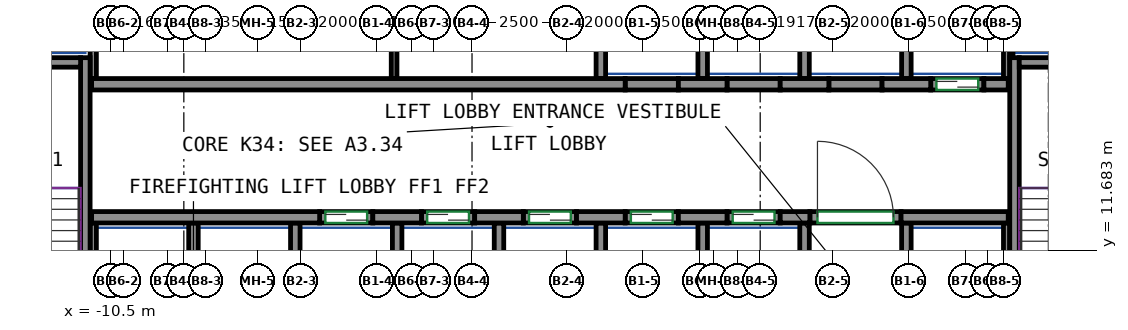
"""IFC4 building model, lengths in metres.
Left out: names, types, materials, properties, quantities, classifications, styles, units other than length and angle.
Written with IfcOpenShell. Run it as: python <this file> out.ifc"""

import sys

from ifc_helpers import new_model, si_unit, direction, frame, frame_2d, origin, place, context, subcontext, project, spatial, rectangle, extrude, source, transform, mapped, element, fill, save


model = new_model("IFC4")
c1 = context("Model", 3, precision=1e-05, world=origin(), true_north=direction((0.0, 1.0)))
c2 = subcontext(c1, "Body", "Model", "MODEL_VIEW")
j1 = project(units=[si_unit("LENGTHUNIT", "METRE"), si_unit("PLANEANGLEUNIT", "RADIAN")], contexts=[c1])
p1 = place(None, origin())
s1 = spatial("IfcSite", under=j1, at=p1, CompositionType="ELEMENT")
p2 = place(p1, origin())
s2 = spatial("IfcBuilding", under=s1, at=p2, CompositionType="ELEMENT")
p3 = place(p2, frame((0.0, 0.0, 147.3)))
s3 = spatial("IfcBuildingStorey", under=s2, at=p3, CompositionType="ELEMENT", Elevation=147.3)
m1 = source(origin(), c2, "Body", "SweptSolid", [
    extrude(rectangle(XDim=7.75, YDim=0.25, at=frame_2d((3.875, 0.0))), origin(), (0.0, 0.0, 1.0), 3.12),
])
p4 = place(p3, frame((-11.175, 9.0, 0.0), z_axis=(0.0, 0.0, 1.0), x_axis=(0.0, 1.0, 0.0)))
e1 = element("IfcWall", 1, at=p4, inside=s3, PredefinedType="SHEAR", context=c2, shape_type="MappedRepresentation", body=[
    mapped(m1, transform((0.0, 0.0, 0.0))),
])
m2 = source(origin(), c2, "Body", "SweptSolid", [
    extrude(rectangle(XDim=3.7, YDim=0.25, at=frame_2d((1.85, 0.0))), origin(), (0.0, 0.0, 1.0), 3.12),
])
p5 = place(p3, frame((-15.0, 16.625, 0.0), z_axis=(0.0, 0.0, 1.0), x_axis=(1.0, 0.0, 0.0)))
e2 = element("IfcWall", 2, at=p5, inside=s3, PredefinedType="SHEAR", context=c2, shape_type="MappedRepresentation", body=[
    mapped(m2, transform((0.0, 0.0, 0.0))),
])
p6 = place(p3, frame((13.275, 9.0, 0.0), z_axis=(0.0, 0.0, 1.0), x_axis=(0.0, 1.0, 0.0)))
e3 = element("IfcWall", 3, at=p6, inside=s3, PredefinedType="SHEAR", context=c2, shape_type="MappedRepresentation", body=[
    mapped(m1, transform((0.0, 0.0, 0.0))),
])
m3 = source(origin(), c2, "Body", "SweptSolid", [
    extrude(rectangle(XDim=3.7, YDim=0.25, at=frame_2d((1.85, 0.0))), origin(), (0.0, 0.0, 1.0), 3.12),
])
p7 = place(p3, frame((13.4, 16.625, 0.0), z_axis=(0.0, 0.0, 1.0), x_axis=(1.0, 0.0, 0.0)))
e4 = element("IfcWall", 4, at=p7, inside=s3, PredefinedType="SHEAR", context=c2, shape_type="MappedRepresentation", body=[
    mapped(m3, transform((0.0, 0.0, 0.0))),
])
m4 = source(origin(), c2, "Body", "SweptSolid", [
    extrude(rectangle(XDim=6.0, YDim=0.3, at=frame_2d((3.0, 0.0))), origin(), (0.0, 0.0, 1.0), 3.12),
])
p8 = place(p3, frame((-11.01, 12.55, 0.0), z_axis=(0.0, 0.0, 1.0), x_axis=(1.0, 0.0, 0.0)))
e5 = element("IfcWall", 5, at=p8, inside=s3, PredefinedType="SHEAR", context=c2, shape_type="MappedRepresentation", body=[
    mapped(m4, transform((0.0, 0.0, 0.0))),
])
m5 = source(origin(), c2, "Body", "SweptSolid", [
    extrude(rectangle(XDim=1.28, YDim=0.3, at=frame_2d((0.64, 0.0))), origin(), (0.0, 0.0, 1.0), 3.12),
])
for number, where, z_axis, x_axis in (
    (6, (-3.61, 12.55, 0.0), (0.0, 0.0, 1.0), (1.0, 0.0, 0.0)),
    (7, (-0.93, 12.55, 0.0), (0.0, 0.0, 1.0), (1.0, 0.0, 0.0)),
    (8, (1.75, 12.55, 0.0), (0.0, 0.0, 1.0), (1.0, 0.0, 0.0)),
    (9, (4.43, 12.55, 0.0), (0.0, 0.0, 1.0), (1.0, 0.0, 0.0)),
):
    element("IfcWall", number, at=place(p3, frame(where, z_axis=z_axis, x_axis=x_axis)), inside=s3, PredefinedType="SHEAR", context=c2, shape_type="MappedRepresentation", body=[
        mapped(m5, transform((0.0, 0.0, 0.0))),
    ])
m6 = source(origin(), c2, "Body", "SweptSolid", [
    extrude(rectangle(XDim=0.78, YDim=0.3, at=frame_2d((0.39, 0.0))), origin(), (0.0, 0.0, 1.0), 3.12),
])
p9 = place(p3, frame((7.11, 12.55, 0.0), z_axis=(0.0, 0.0, 1.0), x_axis=(1.0, 0.0, 0.0)))
e10 = element("IfcWall", 10, at=p9, inside=s3, PredefinedType="SHEAR", context=c2, shape_type="MappedRepresentation", body=[
    mapped(m6, transform((0.0, 0.0, 0.0))),
])
m7 = source(origin(), c2, "Body", "SweptSolid", [
    extrude(rectangle(XDim=2.82, YDim=0.3, at=frame_2d((1.41, 0.0))), origin(), (0.0, 0.0, 1.0), 3.12),
])
p10 = place(p3, frame((10.29, 12.55, 0.0), z_axis=(0.0, 0.0, 1.0), x_axis=(1.0, 0.0, 0.0)))
e11 = element("IfcWall", 11, at=p10, inside=s3, PredefinedType="SHEAR", context=c2, shape_type="MappedRepresentation", body=[
    mapped(m7, transform((0.0, 0.0, 0.0))),
])
m8 = source(origin(), c2, "Body", "SweptSolid", [
    extrude(rectangle(XDim=14.04, YDim=0.3, at=frame_2d((7.02, 0.0))), origin(), (0.0, 0.0, 1.0), 3.12),
])
p11 = place(p3, frame((-11.01, 16.05, 0.0), z_axis=(0.0, 0.0, 1.0), x_axis=(1.0, 0.0, 0.0)))
e12 = element("IfcWall", 12, at=p11, inside=s3, PredefinedType="SHEAR", context=c2, shape_type="MappedRepresentation", body=[
    mapped(m8, transform((0.0, 0.0, 0.0))),
])
p12 = place(p3, frame((4.43, 16.05, 0.0), z_axis=(0.0, 0.0, 1.0), x_axis=(1.0, 0.0, 0.0)))
e13 = element("IfcWall", 13, at=p12, inside=s3, PredefinedType="SHEAR", context=c2, shape_type="MappedRepresentation", body=[
    mapped(m5, transform((0.0, 0.0, 0.0))),
])
m9 = source(origin(), c2, "Body", "SweptSolid", [
    extrude(rectangle(XDim=1.28, YDim=0.3, at=frame_2d((0.64, 0.0))), origin(), (0.0, 0.0, 1.0), 3.12),
])
p13 = place(p3, frame((7.11, 16.05, 0.0), z_axis=(0.0, 0.0, 1.0), x_axis=(1.0, 0.0, 0.0)))
e14 = element("IfcWall", 14, at=p13, inside=s3, PredefinedType="SHEAR", context=c2, shape_type="MappedRepresentation", body=[
    mapped(m9, transform((0.0, 0.0, 0.0))),
])
p14 = place(p3, frame((9.79, 16.05, 0.0), z_axis=(0.0, 0.0, 1.0), x_axis=(1.0, 0.0, 0.0)))
e15 = element("IfcWall", 15, at=p14, inside=s3, PredefinedType="SHEAR", context=c2, shape_type="MappedRepresentation", body=[
    mapped(m5, transform((0.0, 0.0, 0.0))),
])
m10 = source(origin(), c2, "Body", "SweptSolid", [
    extrude(rectangle(XDim=0.64, YDim=0.3, at=frame_2d((0.32, 0.0))), origin(), (0.0, 0.0, 1.0), 3.12),
])
p15 = place(p3, frame((12.47, 16.05, 0.0), z_axis=(0.0, 0.0, 1.0), x_axis=(1.0, 0.0, 0.0)))
e16 = element("IfcWall", 16, at=p15, inside=s3, PredefinedType="SHEAR", context=c2, shape_type="MappedRepresentation", body=[
    mapped(m10, transform((0.0, 0.0, 0.0))),
])
m11 = source(origin(), c2, "Body", "SweptSolid", [
    extrude(rectangle(XDim=1.4, YDim=0.3, at=frame_2d((0.7, 0.0))), origin(), (0.0, 0.0, 1.0), 3.12),
])
p16 = place(p3, frame((-5.01, 12.55, 0.0), z_axis=(0.0, 0.0, 1.0), x_axis=(1.0, 0.0, 0.0)))
e17 = element("IfcWall", 17, at=p16, inside=s3, PredefinedType="PARTITIONING", context=c2, shape_type="MappedRepresentation", body=[
    mapped(m11, transform((0.0, 0.0, 0.0))),
])
p17 = place(p16, frame((0.15, 0.0, 0.0)))
e18 = element("IfcOpeningElement", 18, at=p17, cuts=e17, PredefinedType="OPENING", context=c2, shape_type="SweptSolid", body=[
    extrude(rectangle(XDim=1.1, YDim=2.1, at=frame_2d((0.55, 1.05))), frame((0.0, 0.16, 0.0), z_axis=(0.0, -1.0, 0.0), x_axis=(1.0, 0.0, 0.0)), (0.0, 0.0, 1.0), 0.32),
])
m12 = source(origin(), c2, "Body", "SweptSolid", [
    extrude(rectangle(XDim=1.4, YDim=0.3, at=frame_2d((0.7, 0.0))), origin(), (0.0, 0.0, 1.0), 3.12),
])
p18 = place(p3, frame((-2.33, 12.55, 0.0), z_axis=(0.0, 0.0, 1.0), x_axis=(1.0, 0.0, 0.0)))
e19 = element("IfcWall", 19, at=p18, inside=s3, PredefinedType="PARTITIONING", context=c2, shape_type="MappedRepresentation", body=[
    mapped(m12, transform((0.0, 0.0, 0.0))),
])
p19 = place(p18, frame((0.15, 0.0, 0.0)))
e20 = element("IfcOpeningElement", 20, at=p19, cuts=e19, PredefinedType="OPENING", context=c2, shape_type="SweptSolid", body=[
    extrude(rectangle(XDim=1.1, YDim=2.1, at=frame_2d((0.55, 1.05))), frame((0.0, 0.16, 0.0), z_axis=(0.0, -1.0, 0.0), x_axis=(1.0, 0.0, 0.0)), (0.0, 0.0, 1.0), 0.32),
])
p20 = place(p3, frame((0.35, 12.55, 0.0), z_axis=(0.0, 0.0, 1.0), x_axis=(1.0, 0.0, 0.0)))
e21 = element("IfcWall", 21, at=p20, inside=s3, PredefinedType="PARTITIONING", context=c2, shape_type="MappedRepresentation", body=[
    mapped(m11, transform((0.0, 0.0, 0.0))),
])
p21 = place(p20, frame((0.15, 0.0, 0.0)))
e22 = element("IfcOpeningElement", 22, at=p21, cuts=e21, PredefinedType="OPENING", context=c2, shape_type="SweptSolid", body=[
    extrude(rectangle(XDim=1.1, YDim=2.1, at=frame_2d((0.55, 1.05))), frame((0.0, 0.16, 0.0), z_axis=(0.0, -1.0, 0.0), x_axis=(1.0, 0.0, 0.0)), (0.0, 0.0, 1.0), 0.32),
])
p22 = place(p3, frame((3.03, 12.55, 0.0), z_axis=(0.0, 0.0, 1.0), x_axis=(1.0, 0.0, 0.0)))
e23 = element("IfcWall", 23, at=p22, inside=s3, PredefinedType="PARTITIONING", context=c2, shape_type="MappedRepresentation", body=[
    mapped(m11, transform((0.0, 0.0, 0.0))),
])
p23 = place(p22, frame((0.15, 0.0, 0.0)))
e24 = element("IfcOpeningElement", 24, at=p23, cuts=e23, PredefinedType="OPENING", context=c2, shape_type="SweptSolid", body=[
    extrude(rectangle(XDim=1.1, YDim=2.1, at=frame_2d((0.55, 1.05))), frame((0.0, 0.16, 0.0), z_axis=(0.0, -1.0, 0.0), x_axis=(1.0, 0.0, 0.0)), (0.0, 0.0, 1.0), 0.32),
])
p24 = place(p3, frame((5.71, 12.55, 0.0), z_axis=(0.0, 0.0, 1.0), x_axis=(1.0, 0.0, 0.0)))
e25 = element("IfcWall", 25, at=p24, inside=s3, PredefinedType="PARTITIONING", context=c2, shape_type="MappedRepresentation", body=[
    mapped(m12, transform((0.0, 0.0, 0.0))),
])
p25 = place(p24, frame((0.15, 0.0, 0.0)))
e26 = element("IfcOpeningElement", 26, at=p25, cuts=e25, PredefinedType="OPENING", context=c2, shape_type="SweptSolid", body=[
    extrude(rectangle(XDim=1.1, YDim=2.1, at=frame_2d((0.55, 1.05))), frame((0.0, 0.16, 0.0), z_axis=(0.0, -1.0, 0.0), x_axis=(1.0, 0.0, 0.0)), (0.0, 0.0, 1.0), 0.32),
])
p26 = place(p3, frame((11.07, 16.05, 0.0), z_axis=(0.0, 0.0, 1.0), x_axis=(1.0, 0.0, 0.0)))
e27 = element("IfcWall", 27, at=p26, inside=s3, PredefinedType="PARTITIONING", context=c2, shape_type="MappedRepresentation", body=[
    mapped(m11, transform((0.0, 0.0, 0.0))),
])
p27 = place(p26, frame((0.15, 0.0, 0.0)))
e28 = element("IfcOpeningElement", 28, at=p27, cuts=e27, PredefinedType="OPENING", context=c2, shape_type="SweptSolid", body=[
    extrude(rectangle(XDim=1.1, YDim=2.1, at=frame_2d((0.55, 1.05))), frame((0.0, 0.16, 0.0), z_axis=(0.0, -1.0, 0.0), x_axis=(1.0, 0.0, 0.0)), (0.0, 0.0, 1.0), 0.32),
])
m13 = source(origin(), c2, "Body", "SweptSolid", [
    extrude(rectangle(XDim=2.4, YDim=0.3, at=frame_2d((1.2, 0.0))), origin(), (0.0, 0.0, 1.0), 3.12),
])
p28 = place(p3, frame((7.89, 12.55, 0.0), z_axis=(0.0, 0.0, 1.0), x_axis=(1.0, 0.0, 0.0)))
e29 = element("IfcWall", 29, at=p28, inside=s3, PredefinedType="PARTITIONING", context=c2, shape_type="MappedRepresentation", body=[
    mapped(m13, transform((0.0, 0.0, 0.0))),
])
p29 = place(p28, frame((0.2, 0.0, 0.0)))
e30 = element("IfcOpeningElement", 30, at=p29, cuts=e29, PredefinedType="OPENING", context=c2, shape_type="SweptSolid", body=[
    extrude(rectangle(XDim=2.0, YDim=2.1, at=frame_2d((1.0, 1.05))), frame((0.0, 0.16, 0.0), z_axis=(0.0, -1.0, 0.0), x_axis=(1.0, 0.0, 0.0)), (0.0, 0.0, 1.0), 0.32),
])
p30 = place(p3, frame((3.03, 16.05, 0.0), z_axis=(0.0, 0.0, 1.0), x_axis=(1.0, 0.0, 0.0)))
e31 = element("IfcWall", 31, at=p30, inside=s3, PredefinedType="PARTITIONING", context=c2, shape_type="MappedRepresentation", body=[
    mapped(m11, transform((0.0, 0.0, 0.0))),
])
for number, where, z_axis, x_axis in (
    (32, (5.71, 16.05, 0.0), (0.0, 0.0, 1.0), (1.0, 0.0, 0.0)),
    (33, (8.39, 16.05, 0.0), (0.0, 0.0, 1.0), (1.0, 0.0, 0.0)),
):
    element("IfcWall", number, at=place(p3, frame(where, z_axis=z_axis, x_axis=x_axis)), inside=s3, PredefinedType="PARTITIONING", context=c2, shape_type="MappedRepresentation", body=[
        mapped(m12, transform((0.0, 0.0, 0.0))),
    ])
m14 = source(origin(), c2, "Body", "SweptSolid", [
    extrude(rectangle(XDim=3.275, YDim=0.165, at=frame_2d((1.638, 0.0))), origin(), (0.0, 0.0, 1.0), 3.12),
])
p31 = place(p3, frame((13.067, 16.2, 0.0), z_axis=(0.0, 0.0, 1.0), x_axis=(0.0, 1.0, 0.0)))
e34 = element("IfcWall", 34, at=p31, inside=s3, PredefinedType="PARTITIONING", context=c2, shape_type="MappedRepresentation", body=[
    mapped(m14, transform((0.0, 0.0, 0.0))),
])
m15 = source(origin(), c2, "Body", "SweptSolid", [
    extrude(rectangle(XDim=4.8, YDim=0.165, at=frame_2d((2.4, 0.0))), origin(), (0.0, 0.0, 1.0), 3.12),
])
p32 = place(p3, frame((-10.968, 16.2, 0.0), z_axis=(0.0, 0.0, 1.0), x_axis=(0.0, 1.0, 0.0)))
e35 = element("IfcWall", 35, at=p32, inside=s3, PredefinedType="PARTITIONING", context=c2, shape_type="MappedRepresentation", body=[
    mapped(m15, transform((0.0, 0.0, 0.0))),
])
m16 = source(origin(), c2, "Body", "SweptSolid", [
    extrude(rectangle(XDim=3.275, YDim=0.25, at=frame_2d((1.638, 0.0))), origin(), (0.0, 0.0, 1.0), 3.12),
])
p33 = place(p3, frame((10.43, 16.2, 0.0), z_axis=(0.0, 0.0, 1.0), x_axis=(0.0, 1.0, 0.0)))
e36 = element("IfcWall", 36, at=p33, inside=s3, PredefinedType="PARTITIONING", context=c2, shape_type="MappedRepresentation", body=[
    mapped(m16, transform((0.0, 0.0, 0.0))),
])
m17 = source(origin(), c2, "Body", "SweptSolid", [
    extrude(rectangle(XDim=2.725, YDim=0.085, at=frame_2d((1.363, 0.0))), origin(), (0.0, 0.0, 1.0), 3.12),
])
p34 = place(p3, frame((13.192, 16.75, 0.0), z_axis=(0.0, 0.0, 1.0), x_axis=(0.0, 1.0, 0.0)))
e37 = element("IfcWall", 37, at=p34, inside=s3, PredefinedType="PARTITIONING", context=c2, shape_type="MappedRepresentation", body=[
    mapped(m17, transform((0.0, 0.0, 0.0))),
])
for number, where, z_axis, x_axis in (
    (38, (2.39, 16.2, 0.0), (0.0, 0.0, 1.0), (0.0, 1.0, 0.0)),
    (39, (5.07, 16.2, 0.0), (0.0, 0.0, 1.0), (0.0, 1.0, 0.0)),
    (40, (7.75, 16.2, 0.0), (0.0, 0.0, 1.0), (0.0, 1.0, 0.0)),
):
    element("IfcWall", number, at=place(p3, frame(where, z_axis=z_axis, x_axis=x_axis)), inside=s3, PredefinedType="PARTITIONING", context=c2, shape_type="MappedRepresentation", body=[
        mapped(m16, transform((0.0, 0.0, 0.0))),
    ])
m18 = source(origin(), c2, "Body", "SweptSolid", [
    extrude(rectangle(XDim=3.4, YDim=0.25, at=frame_2d((1.7, 0.0))), origin(), (0.0, 0.0, 1.0), 3.12),
])
p35 = place(p3, frame((10.43, 9.0, 0.0), z_axis=(0.0, 0.0, 1.0), x_axis=(0.0, 1.0, 0.0)))
e41 = element("IfcWall", 41, at=p35, inside=s3, PredefinedType="PARTITIONING", context=c2, shape_type="MappedRepresentation", body=[
    mapped(m18, transform((0.0, 0.0, 0.0))),
])
m19 = source(origin(), c2, "Body", "SweptSolid", [
    extrude(rectangle(XDim=3.4, YDim=0.165, at=frame_2d((1.7, 0.0))), origin(), (0.0, 0.0, 1.0), 3.12),
])
p36 = place(p3, frame((13.067, 9.0, 0.0), z_axis=(0.0, 0.0, 1.0), x_axis=(0.0, 1.0, 0.0)))
e42 = element("IfcWall", 42, at=p36, inside=s3, PredefinedType="PARTITIONING", context=c2, shape_type="MappedRepresentation", body=[
    mapped(m19, transform((0.0, 0.0, 0.0))),
])
for number, where, z_axis, x_axis in (
    (43, (2.39, 9.0, 0.0), (0.0, 0.0, 1.0), (0.0, 1.0, 0.0)),
    (44, (5.07, 9.0, 0.0), (0.0, 0.0, 1.0), (0.0, 1.0, 0.0)),
    (45, (7.75, 9.0, 0.0), (0.0, 0.0, 1.0), (0.0, 1.0, 0.0)),
    (46, (-0.29, 9.0, 0.0), (0.0, 0.0, 1.0), (0.0, 1.0, 0.0)),
):
    element("IfcWall", number, at=place(p3, frame(where, z_axis=z_axis, x_axis=x_axis)), inside=s3, PredefinedType="PARTITIONING", context=c2, shape_type="MappedRepresentation", body=[
        mapped(m18, transform((0.0, 0.0, 0.0))),
    ])
p37 = place(p3, frame((-10.968, 9.0, 0.0), z_axis=(0.0, 0.0, 1.0), x_axis=(0.0, 1.0, 0.0)))
e47 = element("IfcWall", 47, at=p37, inside=s3, PredefinedType="PARTITIONING", context=c2, shape_type="MappedRepresentation", body=[
    mapped(m19, transform((0.0, 0.0, 0.0))),
])
for number, where, z_axis, x_axis in (
    (48, (-2.97, 9.0, 0.0), (0.0, 0.0, 1.0), (0.0, 1.0, 0.0)),
    (49, (-5.65, 9.0, 0.0), (0.0, 0.0, 1.0), (0.0, 1.0, 0.0)),
    (50, (-8.33, 9.0, 0.0), (0.0, 0.0, 1.0), (0.0, 1.0, 0.0)),
):
    element("IfcWall", number, at=place(p3, frame(where, z_axis=z_axis, x_axis=x_axis)), inside=s3, PredefinedType="PARTITIONING", context=c2, shape_type="MappedRepresentation", body=[
        mapped(m18, transform((0.0, 0.0, 0.0))),
    ])
m20 = source(origin(), c2, "Body", "SweptSolid", [
    extrude(rectangle(XDim=4.8, YDim=0.15, at=frame_2d((2.4, 0.0))), origin(), (0.0, 0.0, 1.0), 3.12),
])
p38 = place(p3, frame((-3.05, 16.2, 0.0), z_axis=(0.0, 0.0, 1.0), x_axis=(0.0, 1.0, 0.0)))
e51 = element("IfcWall", 51, at=p38, inside=s3, PredefinedType="PARTITIONING", context=c2, shape_type="MappedRepresentation", body=[
    mapped(m20, transform((0.0, 0.0, 0.0))),
])
p39 = place(p29, origin())
e52 = element("IfcDoor", 52, at=p39, inside=s3, OperationType="DOUBLE_DOOR_SINGLE_SWING", PredefinedType="DOOR", context=c2, shape_type="SweptSolid", body=[
    extrude(rectangle(XDim=2.0, YDim=2.1, at=frame_2d((1.0, 1.05))), frame((0.0, 0.025, 0.0), z_axis=(0.0, -1.0, 0.0), x_axis=(1.0, 0.0, 0.0)), (0.0, 0.0, 1.0), 0.05),
])
fill(e30, e52)
p40 = place(p17, origin())
e53 = element("IfcDoor", 53, at=p40, inside=s3, OperationType="DOUBLE_DOOR_SLIDING", PredefinedType="DOOR", context=c2, shape_type="SweptSolid", body=[
    extrude(rectangle(XDim=1.1, YDim=2.1, at=frame_2d((0.55, 1.05))), frame((0.0, 0.025, 0.0), z_axis=(0.0, -1.0, 0.0), x_axis=(1.0, 0.0, 0.0)), (0.0, 0.0, 1.0), 0.05),
])
fill(e18, e53)
p41 = place(p19, origin())
e54 = element("IfcDoor", 54, at=p41, inside=s3, OperationType="DOUBLE_DOOR_SLIDING", PredefinedType="DOOR", context=c2, shape_type="SweptSolid", body=[
    extrude(rectangle(XDim=1.1, YDim=2.1, at=frame_2d((0.55, 1.05))), frame((0.0, 0.025, 0.0), z_axis=(0.0, -1.0, 0.0), x_axis=(1.0, 0.0, 0.0)), (0.0, 0.0, 1.0), 0.05),
])
fill(e20, e54)
p42 = place(p21, origin())
e55 = element("IfcDoor", 55, at=p42, inside=s3, OperationType="DOUBLE_DOOR_SLIDING", PredefinedType="DOOR", context=c2, shape_type="SweptSolid", body=[
    extrude(rectangle(XDim=1.1, YDim=2.1, at=frame_2d((0.55, 1.05))), frame((0.0, 0.025, 0.0), z_axis=(0.0, -1.0, 0.0), x_axis=(1.0, 0.0, 0.0)), (0.0, 0.0, 1.0), 0.05),
])
fill(e22, e55)
p43 = place(p23, origin())
e56 = element("IfcDoor", 56, at=p43, inside=s3, OperationType="DOUBLE_DOOR_SLIDING", PredefinedType="DOOR", context=c2, shape_type="SweptSolid", body=[
    extrude(rectangle(XDim=1.1, YDim=2.1, at=frame_2d((0.55, 1.05))), frame((0.0, 0.025, 0.0), z_axis=(0.0, -1.0, 0.0), x_axis=(1.0, 0.0, 0.0)), (0.0, 0.0, 1.0), 0.05),
])
fill(e24, e56)
p44 = place(p25, origin())
e57 = element("IfcDoor", 57, at=p44, inside=s3, OperationType="DOUBLE_DOOR_SLIDING", PredefinedType="DOOR", context=c2, shape_type="SweptSolid", body=[
    extrude(rectangle(XDim=1.1, YDim=2.1, at=frame_2d((0.55, 1.05))), frame((0.0, 0.025, 0.0), z_axis=(0.0, -1.0, 0.0), x_axis=(1.0, 0.0, 0.0)), (0.0, 0.0, 1.0), 0.05),
])
fill(e26, e57)
p45 = place(p27, origin())
e58 = element("IfcDoor", 58, at=p45, inside=s3, OperationType="DOUBLE_DOOR_SLIDING", PredefinedType="DOOR", context=c2, shape_type="SweptSolid", body=[
    extrude(rectangle(XDim=1.1, YDim=2.1, at=frame_2d((0.55, 1.05))), frame((0.0, 0.025, 0.0), z_axis=(0.0, -1.0, 0.0), x_axis=(1.0, 0.0, 0.0)), (0.0, 0.0, 1.0), 0.05),
])
fill(e28, e58)
save(model, sys.argv[1])
